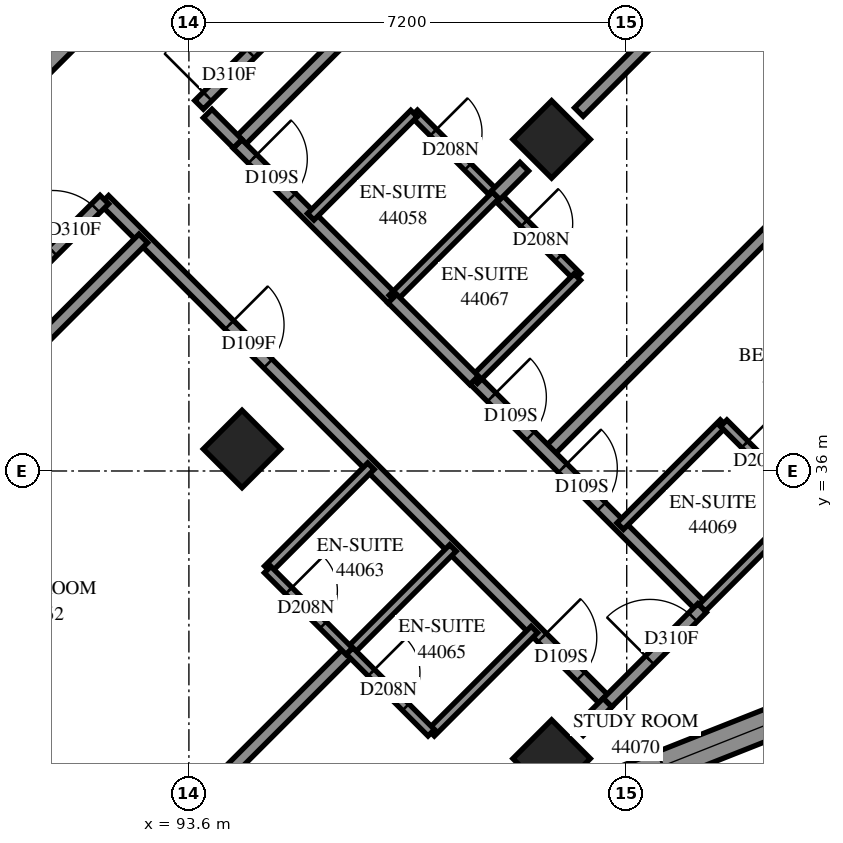
"""IFC4 building model, lengths in metres.
Left out: names, types, materials, properties, quantities, classifications, styles, units other than length and angle.
Written with IfcOpenShell. Run it as: python <this file> out.ifc"""

import sys

from ifc_helpers import new_model, si_unit, direction, frame, frame_2d, origin, origin_2d, place, context, subcontext, project, spatial, polyline, rectangle, outline, extrude, element, fill, save


model = new_model("IFC4")
c1 = context("Model", 3, precision=1e-05, world=origin(), true_north=direction((0.0, 1.0)))
c2 = subcontext(c1, "Body", "Model", "MODEL_VIEW")
j1 = project(units=[si_unit("LENGTHUNIT", "METRE"), si_unit("PLANEANGLEUNIT", "RADIAN")], contexts=[c1])
p1 = place(None, origin())
s1 = spatial("IfcSite", under=j1, at=p1, CompositionType="ELEMENT")
p2 = place(p1, origin())
s2 = spatial("IfcBuilding", under=s1, at=p2, CompositionType="ELEMENT")
p3 = place(p2, frame((0.0, 0.0, 162.6)))
s3 = spatial("IfcBuildingStorey", under=s2, at=p3, CompositionType="ELEMENT", Elevation=162.6)
for number, where, z_axis, x_axis in (
    (1, (99.565, 41.453, 0.0), (0.0, 0.0, 1.0), (0.707, -0.707, 0.0)),
    (2, (94.474, 36.362, 0.0), (0.0, 0.0, 1.0), (0.707, -0.707, 0.0)),
    (3, (99.565, 31.271, 0.0), (0.0, 0.0, 1.0), (0.707, -0.707, 0.0)),
):
    element("IfcColumn", number, at=place(p3, frame(where, z_axis=z_axis, x_axis=x_axis)), inside=s3, PredefinedType="COLUMN", context=c2, shape_type="SweptSolid", body=[
        extrude(rectangle(XDim=0.9, YDim=0.9, at=origin_2d()), origin(), (0.0, 0.0, 1.0), 3.1),
    ])
p4 = place(p3, frame((87.049, 38.695, -0.3), z_axis=(0.0, 0.0, 1.0), x_axis=(0.7071067812, 0.7071067812, 0.0)))
e4 = element("IfcWall", 4, at=p4, inside=s3, PredefinedType="SHEAR", context=c2, shape_type="SweptSolid", body=[
    extrude(rectangle(XDim=14.4, YDim=0.6, at=frame_2d((7.2, 0.0))), origin(), (0.0, 0.0, 1.0), 2.7),
])
p5 = place(p4, frame((4.55, 0.0, 0.3)))
e5 = element("IfcOpeningElement", 5, at=p5, cuts=e4, PredefinedType="OPENING", context=c2, shape_type="SweptSolid", body=[
    extrude(rectangle(XDim=1.1, YDim=2.1, at=frame_2d((0.55, 1.05))), frame((0.0, 0.31, 0.0), z_axis=(0.0, -1.0, 0.0), x_axis=(1.0, 0.0, 0.0)), (0.0, 0.0, 1.0), 0.62),
])
p6 = place(p4, frame((11.35, 0.0, 0.3)))
e6 = element("IfcOpeningElement", 6, at=p6, cuts=e4, PredefinedType="OPENING", context=c2, shape_type="SweptSolid", body=[
    extrude(rectangle(XDim=1.1, YDim=2.1, at=frame_2d((0.55, 1.05))), frame((0.0, 0.31, 0.0), z_axis=(0.0, -1.0, 0.0), x_axis=(1.0, 0.0, 0.0)), (0.0, 0.0, 1.0), 0.62),
])
p7 = place(p3, frame((100.807, 30.918, 0.0), z_axis=(0.0, 0.0, 1.0), x_axis=(0.9297320298, 0.3682368161, 0.0)))
e7 = element("IfcWall", 7, at=p7, inside=s3, PredefinedType="SOLIDWALL", context=c2, shape_type="SweptSolid", body=[
    extrude(outline(polyline([(0.108, -0.25), (5.649, -0.25), (5.423, 0.25), (-0.108, 0.25), (0.108, -0.25)])), origin(), (0.0, 0.0, 1.0), 3.1),
])
p8 = place(p7, frame((0.632, 0.0, 0.45)))
e8 = element("IfcOpeningElement", 8, at=p8, cuts=e7, PredefinedType="OPENING", context=c2, shape_type="SweptSolid", body=[
    extrude(rectangle(XDim=2.8, YDim=2.5, at=frame_2d((1.4, 1.25))), frame((0.0, 0.26, 0.0), z_axis=(0.0, -1.0, 0.0), x_axis=(1.0, 0.0, 0.0)), (0.0, 0.0, 1.0), 0.52),
])
p9 = place(p3, frame((94.401, 41.383, 0.0), z_axis=(0.0, 0.0, 1.0), x_axis=(0.7071067812, 0.7071067812, 0.0)))
e9 = element("IfcWall", 9, at=p9, inside=s3, PredefinedType="PARTITIONING", context=c2, shape_type="SweptSolid", body=[
    extrude(rectangle(XDim=12.066, YDim=0.2, at=frame_2d((6.033, 0.0))), origin(), (0.0, 0.0, 1.0), 3.1),
])
p10 = place(p3, frame((92.209, 40.459, 0.0), z_axis=(0.0, 0.0, 1.0), x_axis=(0.7071067812, -0.7071067812, 0.0)))
e10 = element("IfcWall", 10, at=p10, inside=s3, PredefinedType="PARTITIONING", context=c2, shape_type="SweptSolid", body=[
    extrude(rectangle(XDim=11.698, YDim=0.2, at=frame_2d((5.849, 0.0))), origin(), (0.0, 0.0, 1.0), 3.1),
])
p11 = place(p10, frame((2.908, 0.0, 0.0)))
e11 = element("IfcOpeningElement", 11, at=p11, cuts=e10, PredefinedType="OPENING", context=c2, shape_type="SweptSolid", body=[
    extrude(rectangle(XDim=0.9, YDim=2.1, at=frame_2d((0.45, 1.05))), frame((0.0, 0.11, 0.0), z_axis=(0.0, -1.0, 0.0), x_axis=(1.0, 0.0, 0.0)), (0.0, 0.0, 1.0), 0.22),
])
p12 = place(p10, frame((10.181, 0.0, 0.0)))
e12 = element("IfcOpeningElement", 12, at=p12, cuts=e10, PredefinedType="OPENING", context=c2, shape_type="SweptSolid", body=[
    extrude(rectangle(XDim=0.9, YDim=2.1, at=frame_2d((0.45, 1.05))), frame((0.0, 0.11, 0.0), z_axis=(0.0, -1.0, 0.0), x_axis=(1.0, 0.0, 0.0)), (0.0, 0.0, 1.0), 0.22),
])
p13 = place(p3, frame((93.767, 42.021, 0.0), z_axis=(0.0, 0.0, 1.0), x_axis=(0.7071067812, 0.7071067812, 0.0)))
e13 = element("IfcWall", 13, at=p13, inside=s3, PredefinedType="PARTITIONING", context=c2, shape_type="SweptSolid", body=[
    extrude(rectangle(XDim=9.998, YDim=0.2, at=frame_2d((4.999, 0.0))), origin(), (0.0, 0.0, 1.0), 3.1),
])
p14 = place(p13, frame((0.196, 0.0, 0.0)))
e14 = element("IfcOpeningElement", 14, at=p14, cuts=e13, PredefinedType="OPENING", context=c2, shape_type="SweptSolid", body=[
    extrude(rectangle(XDim=1.0, YDim=2.1, at=frame_2d((0.5, 1.05))), frame((0.0, 0.11, 0.0), z_axis=(0.0, -1.0, 0.0), x_axis=(1.0, 0.0, 0.0)), (0.0, 0.0, 1.0), 0.22),
])
p15 = place(p3, frame((86.332, 33.309, 0.0), z_axis=(0.0, 0.0, 1.0), x_axis=(0.7072098544, 0.7070036929, 0.0)))
e15 = element("IfcWall", 15, at=p15, inside=s3, PredefinedType="PARTITIONING", context=c2, shape_type="SweptSolid", body=[
    extrude(rectangle(XDim=9.216, YDim=0.2, at=frame_2d((4.608, 0.0))), origin(), (0.0, 0.0, 1.0), 3.1),
])
p16 = place(p3, frame((86.837, 35.091, 0.0), z_axis=(0.0, 0.0, 1.0), x_axis=(0.7071067812, 0.7071067812, 0.0)))
e16 = element("IfcWall", 16, at=p16, inside=s3, PredefinedType="PARTITIONING", context=c2, shape_type="SweptSolid", body=[
    extrude(rectangle(XDim=7.597, YDim=0.2, at=frame_2d((3.799, 0.0))), origin(), (0.0, 0.0, 1.0), 3.1),
])
p17 = place(p16, frame((6.395, 0.0, 0.0)))
e17 = element("IfcOpeningElement", 17, at=p17, cuts=e16, PredefinedType="OPENING", context=c2, shape_type="SweptSolid", body=[
    extrude(rectangle(XDim=1.0, YDim=2.1, at=frame_2d((0.5, 1.05))), frame((0.0, 0.11, 0.0), z_axis=(0.0, -1.0, 0.0), x_axis=(1.0, 0.0, 0.0)), (0.0, 0.0, 1.0), 0.22),
])
p18 = place(p3, frame((91.364, 28.163, 0.0), z_axis=(0.0, 0.0, 1.0), x_axis=(0.7071067812, 0.7071067812, 0.0)))
e18 = element("IfcWall", 18, at=p18, inside=s3, PredefinedType="PARTITIONING", context=c2, shape_type="SweptSolid", body=[
    extrude(rectangle(XDim=6.896, YDim=0.2, at=frame_2d((3.448, 0.0))), origin(), (0.0, 0.0, 1.0), 3.1),
])
p19 = place(p3, frame((99.494, 36.292, 0.0), z_axis=(0.0, 0.0, 1.0), x_axis=(0.7071067812, 0.7071067812, 0.0)))
e19 = element("IfcWall", 19, at=p19, inside=s3, PredefinedType="PARTITIONING", context=c2, shape_type="SweptSolid", body=[
    extrude(rectangle(XDim=6.799, YDim=0.2, at=frame_2d((3.4, 0.0))), origin(), (0.0, 0.0, 1.0), 3.1),
])
p20 = place(p3, frame((100.013, 41.903, 0.0), z_axis=(0.0, 0.0, 1.0), x_axis=(0.7071067812, 0.7071067812, 0.0)))
e20 = element("IfcWall", 20, at=p20, inside=s3, PredefinedType="PARTITIONING", context=c2, shape_type="SweptSolid", body=[
    extrude(rectangle(XDim=5.928, YDim=0.2, at=frame_2d((2.964, 0.0))), origin(), (0.0, 0.0, 1.0), 3.1),
])
p21 = place(p3, frame((98.295, 37.497, 0.0), z_axis=(0.0, 0.0, 1.0), x_axis=(0.7071067812, -0.7071067812, 0.0)))
e21 = element("IfcWall", 21, at=p21, inside=s3, PredefinedType="PARTITIONING", context=c2, shape_type="SweptSolid", body=[
    extrude(rectangle(XDim=5.301, YDim=0.2, at=frame_2d((2.65, 0.0))), origin(), (0.0, 0.0, 1.0), 3.1),
])
p22 = place(p21, frame((0.401, 0.0, 0.0)))
e22 = element("IfcOpeningElement", 22, at=p22, cuts=e21, PredefinedType="OPENING", context=c2, shape_type="SweptSolid", body=[
    extrude(rectangle(XDim=0.9, YDim=2.1, at=frame_2d((0.45, 1.05))), frame((0.0, 0.11, 0.0), z_axis=(0.0, -1.0, 0.0), x_axis=(1.0, 0.0, 0.0)), (0.0, 0.0, 1.0), 0.22),
])
p23 = place(p21, frame((2.05, 0.0, 0.0)))
e23 = element("IfcOpeningElement", 23, at=p23, cuts=e21, PredefinedType="OPENING", context=c2, shape_type="SweptSolid", body=[
    extrude(rectangle(XDim=0.9, YDim=2.1, at=frame_2d((0.45, 1.05))), frame((0.0, 0.11, 0.0), z_axis=(0.0, -1.0, 0.0), x_axis=(1.0, 0.0, 0.0)), (0.0, 0.0, 1.0), 0.22),
])
p24 = place(p3, frame((97.305, 41.881, 0.0), z_axis=(0.0, 0.0, 1.0), x_axis=(0.7067382634, -0.707475107, 0.0)))
e24 = element("IfcWall", 24, at=p24, inside=s3, PredefinedType="PARTITIONING", context=c2, shape_type="SweptSolid", body=[
    extrude(rectangle(XDim=3.8, YDim=0.15, at=frame_2d((1.9, 0.0))), origin(), (0.0, 0.0, 1.0), 3.1),
])
p25 = place(p24, frame((0.445, 0.0, 0.0)))
e25 = element("IfcOpeningElement", 25, at=p25, cuts=e24, PredefinedType="OPENING", context=c2, shape_type="SweptSolid", body=[
    extrude(rectangle(XDim=0.8, YDim=2.1, at=frame_2d((0.4, 1.05))), frame((0.0, 0.085, 0.0), z_axis=(0.0, -1.0, 0.0), x_axis=(1.0, 0.0, 0.0)), (0.0, 0.0, 1.0), 0.17),
])
p26 = place(p24, frame((2.556, 0.0, 0.0)))
e26 = element("IfcOpeningElement", 26, at=p26, cuts=e24, PredefinedType="OPENING", context=c2, shape_type="SweptSolid", body=[
    extrude(rectangle(XDim=0.8, YDim=2.1, at=frame_2d((0.4, 1.05))), frame((0.0, 0.085, 0.0), z_axis=(0.0, -1.0, 0.0), x_axis=(1.0, 0.0, 0.0)), (0.0, 0.0, 1.0), 0.17),
])
p27 = place(p3, frame((94.399, 41.379, 0.0), z_axis=(0.0, 0.0, 1.0), x_axis=(0.7071067812, -0.7071067812, 0.0)))
e27 = element("IfcWall", 27, at=p27, inside=s3, PredefinedType="PARTITIONING", context=c2, shape_type="SweptSolid", body=[
    extrude(rectangle(XDim=3.601, YDim=0.2, at=frame_2d((1.8, 0.0))), origin(), (0.0, 0.0, 1.0), 3.1),
])
p28 = place(p27, frame((0.35, 0.0, 0.0)))
e28 = element("IfcOpeningElement", 28, at=p28, cuts=e27, PredefinedType="OPENING", context=c2, shape_type="SweptSolid", body=[
    extrude(rectangle(XDim=0.9, YDim=2.1, at=frame_2d((0.45, 1.05))), frame((0.0, 0.11, 0.0), z_axis=(0.0, -1.0, 0.0), x_axis=(1.0, 0.0, 0.0)), (0.0, 0.0, 1.0), 0.22),
])
for number, where, z_axis, x_axis in (
    (29, (95.603, 40.181, 0.0), (0.0, 0.0, 1.0), (0.707, 0.707, 0.0)),
    (30, (96.947, 38.837, 0.0), (0.0, 0.0, 1.0), (0.707, 0.707, 0.0)),
    (31, (97.583, 31.695, 0.0), (0.0, 0.0, 1.0), (0.707, 0.707, 0.0)),
):
    element("IfcWall", number, at=place(p3, frame(where, z_axis=z_axis, x_axis=x_axis)), inside=s3, PredefinedType="PARTITIONING", context=c2, shape_type="SweptSolid", body=[
        extrude(rectangle(XDim=2.401, YDim=0.15, at=frame_2d((1.201, 0.0))), origin(), (0.0, 0.0, 1.0), 3.1),
    ])
for number, where, z_axis, x_axis in (
    (32, (100.693, 35.093, 0.0), (0.0, 0.0, 1.0), (0.708, 0.707, 0.0)),
    (33, (96.245, 33.035, 0.0), (0.0, 0.0, 1.0), (0.707, 0.708, 0.0)),
):
    element("IfcWall", number, at=place(p3, frame(where, z_axis=z_axis, x_axis=x_axis)), inside=s3, PredefinedType="PARTITIONING", context=c2, shape_type="SweptSolid", body=[
        extrude(rectangle(XDim=2.4, YDim=0.15, at=frame_2d((1.2, 0.0))), origin(), (0.0, 0.0, 1.0), 3.1),
    ])
for number, where, z_axis, x_axis in (
    (34, (94.897, 34.383, 0.0), (0.0, 0.0, 1.0), (0.707, 0.707, 0.0)),
    (35, (98.291, 37.495, 0.0), (0.0, 0.0, 1.0), (0.707, 0.707, 0.0)),
):
    element("IfcWall", number, at=place(p3, frame(where, z_axis=z_axis, x_axis=x_axis)), inside=s3, PredefinedType="PARTITIONING", context=c2, shape_type="SweptSolid", body=[
        extrude(rectangle(XDim=2.398, YDim=0.15, at=frame_2d((1.199, 0.0))), origin(), (0.0, 0.0, 1.0), 3.1),
    ])
p29 = place(p3, frame((102.039, 33.747, 0.0), z_axis=(0.0, 0.0, 1.0), x_axis=(0.7071067812, 0.7071067812, 0.0)))
e36 = element("IfcWall", 36, at=p29, inside=s3, PredefinedType="PARTITIONING", context=c2, shape_type="SweptSolid", body=[
    extrude(rectangle(XDim=2.398, YDim=0.15, at=frame_2d((1.199, 0.0))), origin(), (0.0, 0.0, 1.0), 2.6),
])
p30 = place(p3, frame((100.483, 32.191, 0.0), z_axis=(0.0, 0.0, 1.0), x_axis=(0.7071067812, 0.7071067812, 0.0)))
e37 = element("IfcWall", 37, at=p30, inside=s3, PredefinedType="PARTITIONING", context=c2, shape_type="SweptSolid", body=[
    extrude(rectangle(XDim=2.2, YDim=0.2, at=frame_2d((1.1, 0.0))), origin(), (0.0, 0.0, 1.0), 2.6),
])
p31 = place(p30, frame((0.987, 0.0, 0.0)))
e38 = element("IfcOpeningElement", 38, at=p31, cuts=e37, PredefinedType="OPENING", context=c2, shape_type="SweptSolid", body=[
    extrude(rectangle(XDim=1.0, YDim=2.1, at=frame_2d((0.5, 1.05))), frame((0.0, 0.11, 0.0), z_axis=(0.0, -1.0, 0.0), x_axis=(1.0, 0.0, 0.0)), (0.0, 0.0, 1.0), 0.22),
])
p32 = place(p3, frame((94.895, 34.379, 0.0), z_axis=(0.0, 0.0, 1.0), x_axis=(0.7071067812, -0.7071067812, 0.0)))
e39 = element("IfcWall", 39, at=p32, inside=s3, PredefinedType="PARTITIONING", context=c2, shape_type="SweptSolid", body=[
    extrude(rectangle(XDim=1.901, YDim=0.15, at=frame_2d((0.95, 0.0))), origin(), (0.0, 0.0, 1.0), 3.1),
])
p33 = place(p32, frame((0.491, 0.0, 0.0)))
e40 = element("IfcOpeningElement", 40, at=p33, cuts=e39, PredefinedType="OPENING", context=c2, shape_type="SweptSolid", body=[
    extrude(rectangle(XDim=0.8, YDim=2.1, at=frame_2d((0.4, 1.05))), frame((0.0, 0.085, 0.0), z_axis=(0.0, -1.0, 0.0), x_axis=(1.0, 0.0, 0.0)), (0.0, 0.0, 1.0), 0.17),
])
p34 = place(p3, frame((96.946, 38.834, 0.0), z_axis=(0.0, 0.0, 1.0), x_axis=(0.7076330979, -0.7065800724, 0.0)))
e41 = element("IfcWall", 41, at=p34, inside=s3, PredefinedType="PARTITIONING", context=c2, shape_type="SweptSolid", body=[
    extrude(rectangle(XDim=1.899, YDim=0.2, at=frame_2d((0.95, 0.0))), origin(), (0.0, 0.0, 1.0), 3.1),
])
p35 = place(p3, frame((102.394, 36.786, 0.0), z_axis=(0.0, 0.0, 1.0), x_axis=(0.7065800724, -0.7076330979, 0.0)))
e42 = element("IfcWall", 42, at=p35, inside=s3, PredefinedType="PARTITIONING", context=c2, shape_type="SweptSolid", body=[
    extrude(rectangle(XDim=1.899, YDim=0.15, at=frame_2d((0.95, 0.0))), origin(), (0.0, 0.0, 1.0), 3.1),
])
p36 = place(p35, frame((0.492, 0.0, 0.0)))
e43 = element("IfcOpeningElement", 43, at=p36, cuts=e42, PredefinedType="OPENING", context=c2, shape_type="SweptSolid", body=[
    extrude(rectangle(XDim=0.8, YDim=2.1, at=frame_2d((0.4, 1.05))), frame((0.0, 0.085, 0.0), z_axis=(0.0, -1.0, 0.0), x_axis=(1.0, 0.0, 0.0)), (0.0, 0.0, 1.0), 0.17),
])
p37 = place(p3, frame((96.243, 33.039, 0.0), z_axis=(0.0, 0.0, 1.0), x_axis=(0.7065800724, -0.7076330979, 0.0)))
e44 = element("IfcWall", 44, at=p37, inside=s3, PredefinedType="PARTITIONING", context=c2, shape_type="SweptSolid", body=[
    extrude(rectangle(XDim=1.899, YDim=0.15, at=frame_2d((0.95, 0.0))), origin(), (0.0, 0.0, 1.0), 3.1),
])
p38 = place(p37, frame((0.504, 0.0, 0.0)))
e45 = element("IfcOpeningElement", 45, at=p38, cuts=e44, PredefinedType="OPENING", context=c2, shape_type="SweptSolid", body=[
    extrude(rectangle(XDim=0.8, YDim=2.1, at=frame_2d((0.4, 1.05))), frame((0.0, 0.085, 0.0), z_axis=(0.0, -1.0, 0.0), x_axis=(1.0, 0.0, 0.0)), (0.0, 0.0, 1.0), 0.17),
])
p39 = place(p3, frame((93.909, 41.879, 0.0), z_axis=(0.0, 0.0, 1.0), x_axis=(0.7056768426, -0.7085338339, 0.0)))
e46 = element("IfcWall", 46, at=p39, inside=s3, PredefinedType="PARTITIONING", context=c2, shape_type="SweptSolid", body=[
    extrude(rectangle(XDim=0.7, YDim=0.2, at=frame_2d((0.35, 0.0))), origin(), (0.0, 0.0, 1.0), 3.1),
])
p40 = place(p3, frame((98.645, 40.535, 0.0), z_axis=(0.0, 0.0, 1.0), x_axis=(0.7071067812, 0.7071067812, 0.0)))
e47 = element("IfcWall", 47, at=p40, inside=s3, PredefinedType="PARTITIONING", context=c2, shape_type="SweptSolid", body=[
    extrude(rectangle(XDim=0.665, YDim=0.2, at=frame_2d((0.332, 0.0))), origin(), (0.0, 0.0, 1.0), 3.1),
])
p41 = place(p3, frame((100.013, 31.721, 0.0), z_axis=(0.0, 0.0, 1.0), x_axis=(0.7071067812, 0.7071067812, 0.0)))
e48 = element("IfcWall", 48, at=p41, inside=s3, PredefinedType="PARTITIONING", context=c2, shape_type="SweptSolid", body=[
    extrude(rectangle(XDim=0.665, YDim=0.2, at=frame_2d((0.332, 0.0))), origin(), (0.0, 0.0, 1.0), 2.6),
])
p42 = place(p8, origin())
e49 = element("IfcWindow", 49, at=p42, inside=s3, PartitioningType="SINGLE_PANEL", PredefinedType="WINDOW", context=c2, shape_type="SweptSolid", body=[
    extrude(rectangle(XDim=2.8, YDim=2.5, at=frame_2d((1.4, 1.25))), frame((0.0, 0.18, 0.0), z_axis=(0.0, -1.0, 0.0), x_axis=(1.0, 0.0, 0.0)), (0.0, 0.0, 1.0), 0.06),
])
fill(e8, e49)
p43 = place(p14, origin())
e50 = element("IfcDoor", 50, at=p43, inside=s3, OperationType="SINGLE_SWING_LEFT", PredefinedType="DOOR", context=c2, shape_type="SweptSolid", body=[
    extrude(rectangle(XDim=1.0, YDim=2.1, at=frame_2d((0.5, 1.05))), frame((0.0, 0.025, 0.0), z_axis=(0.0, -1.0, 0.0), x_axis=(1.0, 0.0, 0.0)), (0.0, 0.0, 1.0), 0.05),
])
fill(e14, e50)
p44 = place(p28, origin())
e51 = element("IfcDoor", 51, at=p44, inside=s3, OperationType="SINGLE_SWING_RIGHT", PredefinedType="DOOR", context=c2, shape_type="SweptSolid", body=[
    extrude(rectangle(XDim=0.9, YDim=2.1, at=frame_2d((0.45, 1.05))), frame((0.0, 0.025, 0.0), z_axis=(0.0, -1.0, 0.0), x_axis=(1.0, 0.0, 0.0)), (0.0, 0.0, 1.0), 0.05),
])
fill(e28, e51)
p45 = place(p25, origin())
e52 = element("IfcDoor", 52, at=p45, inside=s3, OperationType="SINGLE_SWING_RIGHT", PredefinedType="DOOR", context=c2, shape_type="SweptSolid", body=[
    extrude(rectangle(XDim=0.8, YDim=2.1, at=frame_2d((0.4, 1.05))), frame((0.0, 0.025, 0.0), z_axis=(0.0, -1.0, 0.0), x_axis=(1.0, 0.0, 0.0)), (0.0, 0.0, 1.0), 0.05),
])
fill(e25, e52)
p46 = place(p17, origin())
e53 = element("IfcDoor", 53, at=p46, inside=s3, OperationType="SINGLE_SWING_LEFT", PredefinedType="DOOR", context=c2, shape_type="SweptSolid", body=[
    extrude(rectangle(XDim=1.0, YDim=2.1, at=frame_2d((0.5, 1.05))), frame((0.0, 0.025, 0.0), z_axis=(0.0, -1.0, 0.0), x_axis=(1.0, 0.0, 0.0)), (0.0, 0.0, 1.0), 0.05),
])
fill(e17, e53)
p47 = place(p11, origin())
e54 = element("IfcDoor", 54, at=p47, inside=s3, OperationType="SINGLE_SWING_LEFT", PredefinedType="DOOR", context=c2, shape_type="SweptSolid", body=[
    extrude(rectangle(XDim=0.9, YDim=2.1, at=frame_2d((0.45, 1.05))), frame((0.0, 0.025, 0.0), z_axis=(0.0, -1.0, 0.0), x_axis=(1.0, 0.0, 0.0)), (0.0, 0.0, 1.0), 0.05),
])
fill(e11, e54)
p48 = place(p33, origin())
e55 = element("IfcDoor", 55, at=p48, inside=s3, OperationType="SINGLE_SWING_RIGHT", PredefinedType="DOOR", context=c2, shape_type="SweptSolid", body=[
    extrude(rectangle(XDim=0.8, YDim=2.1, at=frame_2d((0.4, 1.05))), frame((0.0, 0.025, 0.0), z_axis=(0.0, -1.0, 0.0), x_axis=(1.0, 0.0, 0.0)), (0.0, 0.0, 1.0), 0.05),
])
fill(e40, e55)
p49 = place(p12, origin())
e56 = element("IfcDoor", 56, at=p49, inside=s3, OperationType="SINGLE_SWING_LEFT", PredefinedType="DOOR", context=c2, shape_type="SweptSolid", body=[
    extrude(rectangle(XDim=0.9, YDim=2.1, at=frame_2d((0.45, 1.05))), frame((0.0, 0.025, 0.0), z_axis=(0.0, -1.0, 0.0), x_axis=(1.0, 0.0, 0.0)), (0.0, 0.0, 1.0), 0.05),
])
fill(e12, e56)
p50 = place(p38, origin())
e57 = element("IfcDoor", 57, at=p50, inside=s3, OperationType="SINGLE_SWING_RIGHT", PredefinedType="DOOR", context=c2, shape_type="SweptSolid", body=[
    extrude(rectangle(XDim=0.8, YDim=2.1, at=frame_2d((0.4, 1.05))), frame((0.0, 0.025, 0.0), z_axis=(0.0, -1.0, 0.0), x_axis=(1.0, 0.0, 0.0)), (0.0, 0.0, 1.0), 0.05),
])
fill(e45, e57)
p51 = place(p22, origin())
e58 = element("IfcDoor", 58, at=p51, inside=s3, OperationType="SINGLE_SWING_LEFT", PredefinedType="DOOR", context=c2, shape_type="SweptSolid", body=[
    extrude(rectangle(XDim=0.9, YDim=2.1, at=frame_2d((0.45, 1.05))), frame((0.0, 0.025, 0.0), z_axis=(0.0, -1.0, 0.0), x_axis=(1.0, 0.0, 0.0)), (0.0, 0.0, 1.0), 0.05),
])
fill(e22, e58)
p52 = place(p26, origin())
e59 = element("IfcDoor", 59, at=p52, inside=s3, OperationType="SINGLE_SWING_RIGHT", PredefinedType="DOOR", context=c2, shape_type="SweptSolid", body=[
    extrude(rectangle(XDim=0.8, YDim=2.1, at=frame_2d((0.4, 1.05))), frame((0.0, 0.025, 0.0), z_axis=(0.0, -1.0, 0.0), x_axis=(1.0, 0.0, 0.0)), (0.0, 0.0, 1.0), 0.05),
])
fill(e26, e59)
p53 = place(p23, origin())
e60 = element("IfcDoor", 60, at=p53, inside=s3, OperationType="SINGLE_SWING_RIGHT", PredefinedType="DOOR", context=c2, shape_type="SweptSolid", body=[
    extrude(rectangle(XDim=0.9, YDim=2.1, at=frame_2d((0.45, 1.05))), frame((0.0, 0.025, 0.0), z_axis=(0.0, -1.0, 0.0), x_axis=(1.0, 0.0, 0.0)), (0.0, 0.0, 1.0), 0.05),
])
fill(e23, e60)
p54 = place(p36, origin())
e61 = element("IfcDoor", 61, at=p54, inside=s3, OperationType="SINGLE_SWING_RIGHT", PredefinedType="DOOR", context=c2, shape_type="SweptSolid", body=[
    extrude(rectangle(XDim=0.8, YDim=2.1, at=frame_2d((0.4, 1.05))), frame((0.0, 0.025, 0.0), z_axis=(0.0, -1.0, 0.0), x_axis=(1.0, 0.0, 0.0)), (0.0, 0.0, 1.0), 0.05),
])
fill(e43, e61)
p55 = place(p31, origin())
e62 = element("IfcDoor", 62, at=p55, inside=s3, OperationType="SINGLE_SWING_RIGHT", PredefinedType="DOOR", context=c2, shape_type="SweptSolid", body=[
    extrude(rectangle(XDim=1.0, YDim=2.1, at=frame_2d((0.5, 1.05))), frame((0.0, 0.025, 0.0), z_axis=(0.0, -1.0, 0.0), x_axis=(1.0, 0.0, 0.0)), (0.0, 0.0, 1.0), 0.05),
])
fill(e38, e62)
save(model, sys.argv[1])
